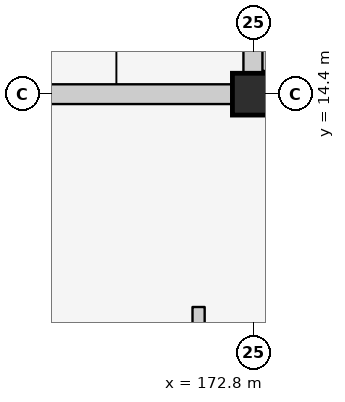
"""IFC4 building model, lengths in metres.
Left out: names, types, materials, properties, quantities, classifications, styles, units other than length and angle.
Written with IfcOpenShell. Run it as: python <this file> out.ifc"""

import sys

from ifc_helpers import new_model, si_unit, direction, frame, frame_2d, origin, origin_2d, place, context, subcontext, project, spatial, rectangle, extrude, element, save


model = new_model("IFC4")
c1 = context("Model", 3, precision=1e-05, world=origin(), true_north=direction((0.0, 1.0)))
c2 = subcontext(c1, "Body", "Model", "MODEL_VIEW")
j1 = project(units=[si_unit("LENGTHUNIT", "METRE"), si_unit("PLANEANGLEUNIT", "RADIAN")], contexts=[c1])
p1 = place(None, origin())
s1 = spatial("IfcSite", under=j1, at=p1, CompositionType="ELEMENT")
p2 = place(p1, origin())
s2 = spatial("IfcBuilding", under=s1, at=p2, CompositionType="ELEMENT")
p3 = place(p2, frame((0.0, 0.0, 31.5)))
s3 = spatial("IfcBuildingStorey", under=s2, at=p3, CompositionType="ELEMENT", Elevation=31.5)
p4 = place(p3, frame((172.8, 14.4, 0.0), z_axis=(0.0, 0.0, 1.0), x_axis=(1.0, 0.0, 0.0)))
e1 = element("IfcColumn", 1, at=p4, inside=s3, PredefinedType="COLUMN", context=c2, shape_type="SweptSolid", body=[
    extrude(rectangle(XDim=0.55, YDim=0.55, at=origin_2d()), origin(), (0.0, 0.0, 1.0), 3.3),
])
p5 = place(p3, frame((165.875, 14.4, 0.0), z_axis=(0.0, 0.0, 1.0), x_axis=(1.0, 0.0, 0.0)))
e2 = element("IfcWall", 2, at=p5, inside=s3, PredefinedType="ELEMENTEDWALL", context=c2, shape_type="SweptSolid", body=[
    extrude(rectangle(XDim=6.65, YDim=0.26, at=frame_2d((3.325, 0.0))), origin(), (0.0, 0.0, 1.0), 2.465),
])
p6 = place(p5, frame((2.825, 0.0, 1.2)))
e3 = element("IfcOpeningElement", 3, at=p6, cuts=e2, PredefinedType="OPENING", context=c2, shape_type="SweptSolid", body=[
    extrude(rectangle(XDim=1.0, YDim=0.9, at=frame_2d((0.5, 0.45))), frame((0.0, 0.145, 0.0), z_axis=(0.0, -1.0, 0.0), x_axis=(1.0, 0.0, 0.0)), (0.0, 0.0, 1.0), 0.29),
])
p7 = place(p3, frame((172.8, 14.675, 0.0), z_axis=(0.0, 0.0, 1.0), x_axis=(0.0, 1.0, 0.0)))
e4 = element("IfcWall", 4, at=p7, inside=s3, PredefinedType="ELEMENTEDWALL", context=c2, shape_type="SweptSolid", body=[
    extrude(rectangle(XDim=6.65, YDim=0.26, at=frame_2d((3.325, 0.0))), origin(), (0.0, 0.0, 1.0), 2.565),
])
p8 = place(p7, frame((2.5, 0.0, 0.0)))
e5 = element("IfcOpeningElement", 5, at=p8, cuts=e4, PredefinedType="OPENING", context=c2, shape_type="SweptSolid", body=[
    extrude(rectangle(XDim=1.4, YDim=2.1, at=frame_2d((0.7, 1.05))), frame((0.0, 0.145, 0.0), z_axis=(0.0, -1.0, 0.0), x_axis=(1.0, 0.0, 0.0)), (0.0, 0.0, 1.0), 0.29),
])
p9 = place(p3, frame((172.08, 7.28, 0.0), z_axis=(0.0, 0.0, 1.0), x_axis=(0.0, 1.0, 0.0)))
e6 = element("IfcWall", 6, at=p9, inside=s3, PredefinedType="PARTITIONING", context=c2, shape_type="SweptSolid", body=[
    extrude(rectangle(XDim=4.32, YDim=0.16, at=frame_2d((2.16, 0.0))), origin(), (0.0, 0.0, 1.0), 3.08),
])
p10 = place(p9, frame((0.72, 0.0, 0.0)))
e7 = element("IfcOpeningElement", 7, at=p10, cuts=e6, PredefinedType="OPENING", context=c2, shape_type="SweptSolid", body=[
    extrude(rectangle(XDim=1.2, YDim=2.2, at=frame_2d((0.6, 1.1))), frame((0.0, 0.095, 0.0), z_axis=(0.0, -1.0, 0.0), x_axis=(1.0, 0.0, 0.0)), (0.0, 0.0, 1.0), 0.19),
])
p11 = place(p3, frame((173.0, 14.705, 0.0), z_axis=(0.0, 0.0, 1.0), x_axis=(0.0, 1.0, 0.0)))
e8 = element("IfcWall", 8, at=p11, inside=s3, PredefinedType="PARTITIONING", context=c2, shape_type="SweptSolid", body=[
    extrude(rectangle(XDim=6.59, YDim=0.16, at=frame_2d((3.295, 0.0))), origin(), (0.0, 0.0, 1.0), 3.08),
])
p12 = place(p11, frame((2.785, 0.0, 0.0)))
e9 = element("IfcOpeningElement", 9, at=p12, cuts=e8, PredefinedType="OPENING", context=c2, shape_type="SweptSolid", body=[
    extrude(rectangle(XDim=1.02, YDim=2.18, at=frame_2d((0.51, 1.09))), frame((0.0, 0.095, 0.0), z_axis=(0.0, -1.0, 0.0), x_axis=(1.0, 0.0, 0.0)), (0.0, 0.0, 1.0), 0.19),
])
save(model, sys.argv[1])
